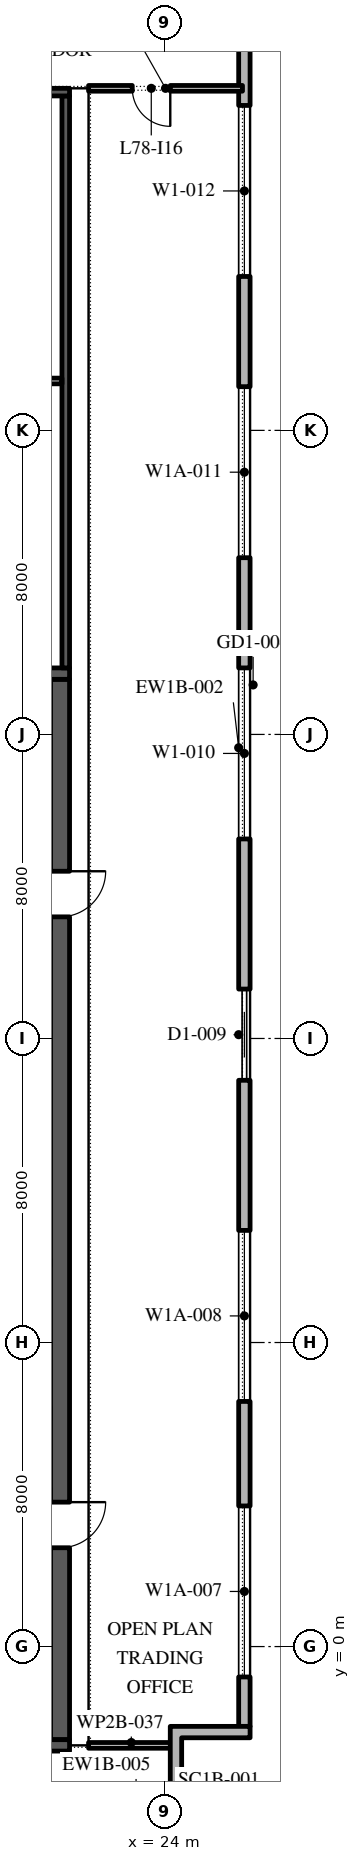
"""IFC4 building model, lengths in metres.
Left out: names, types, materials, properties, quantities, classifications, styles, units other than length and angle.
Written with IfcOpenShell. Run it as: python <this file> out.ifc"""

import sys

from ifc_helpers import new_model, si_unit, direction, frame, frame_2d, origin, place, context, subcontext, project, spatial, polyline, rectangle, outline, extrude, element, fill, save


model = new_model("IFC4")
c1 = context("Model", 3, precision=1e-05, world=origin(), true_north=direction((0.0, 1.0)))
c2 = subcontext(c1, "Body", "Model", "MODEL_VIEW")
j1 = project(units=[si_unit("LENGTHUNIT", "METRE"), si_unit("PLANEANGLEUNIT", "RADIAN")], contexts=[c1])
p1 = place(None, origin())
s1 = spatial("IfcSite", under=j1, at=p1, CompositionType="ELEMENT")
p2 = place(p1, origin())
s2 = spatial("IfcBuilding", under=s1, at=p2, CompositionType="ELEMENT")
p3 = place(p2, frame((0.0, 0.0, 355.2)))
s3 = spatial("IfcBuildingStorey", under=s2, at=p3, CompositionType="ELEMENT", Elevation=355.2)
p4 = place(p3, frame((26.1, -2.1, 0.0), z_axis=(0.0, 0.0, 1.0), x_axis=(0.0, 1.0, 0.0)))
e1 = element("IfcWall", 1, at=p4, inside=s3, PredefinedType="STANDARD", context=c2, shape_type="SweptSolid", body=[
    extrude(rectangle(XDim=51.5, YDim=0.3, at=frame_2d((25.75, 0.0))), origin(), (0.0, 0.0, 1.0), 3.95),
])
p5 = place(p4, frame((1.3, 0.0, 0.45)))
e2 = element("IfcOpeningElement", 2, at=p5, cuts=e1, PredefinedType="OPENING", context=c2, shape_type="SweptSolid", body=[
    extrude(rectangle(XDim=4.5, YDim=3.0, at=frame_2d((2.25, 1.5))), frame((0.0, 0.16, 0.0), z_axis=(0.0, -1.0, 0.0), x_axis=(1.0, 0.0, 0.0)), (0.0, 0.0, 1.0), 0.32),
])
p6 = place(p4, frame((8.55, 0.0, 0.45)))
e3 = element("IfcOpeningElement", 3, at=p6, cuts=e1, PredefinedType="OPENING", context=c2, shape_type="SweptSolid", body=[
    extrude(rectangle(XDim=4.5, YDim=3.0, at=frame_2d((2.25, 1.5))), frame((0.0, 0.16, 0.0), z_axis=(0.0, -1.0, 0.0), x_axis=(1.0, 0.0, 0.0)), (0.0, 0.0, 1.0), 0.32),
])
p7 = place(p4, frame((17.0, 0.0, 0.0)))
e4 = element("IfcOpeningElement", 4, at=p7, cuts=e1, PredefinedType="OPENING", context=c2, shape_type="SweptSolid", body=[
    extrude(rectangle(XDim=2.4, YDim=3.5, at=frame_2d((1.2, 1.75))), frame((0.0, 0.16, 0.0), z_axis=(0.0, -1.0, 0.0), x_axis=(1.0, 0.0, 0.0)), (0.0, 0.0, 1.0), 0.32),
])
p8 = place(p4, frame((23.35, 0.0, 0.45)))
e5 = element("IfcOpeningElement", 5, at=p8, cuts=e1, PredefinedType="OPENING", context=c2, shape_type="SweptSolid", body=[
    extrude(rectangle(XDim=4.5, YDim=3.05, at=frame_2d((2.25, 1.525))), frame((0.0, 0.16, 0.0), z_axis=(0.0, -1.0, 0.0), x_axis=(1.0, 0.0, 0.0)), (0.0, 0.0, 1.0), 0.32),
])
p9 = place(p4, frame((30.75, 0.0, 0.45)))
e6 = element("IfcOpeningElement", 6, at=p9, cuts=e1, PredefinedType="OPENING", context=c2, shape_type="SweptSolid", body=[
    extrude(rectangle(XDim=4.5, YDim=3.0, at=frame_2d((2.25, 1.5))), frame((0.0, 0.16, 0.0), z_axis=(0.0, -1.0, 0.0), x_axis=(1.0, 0.0, 0.0)), (0.0, 0.0, 1.0), 0.32),
])
p10 = place(p4, frame((38.15, 0.0, 0.45)))
e7 = element("IfcOpeningElement", 7, at=p10, cuts=e1, PredefinedType="OPENING", context=c2, shape_type="SweptSolid", body=[
    extrude(rectangle(XDim=4.5, YDim=3.05, at=frame_2d((2.25, 1.525))), frame((0.0, 0.16, 0.0), z_axis=(0.0, -1.0, 0.0), x_axis=(1.0, 0.0, 0.0)), (0.0, 0.0, 1.0), 0.32),
])
p11 = place(p4, frame((46.6, 0.0, 0.0)))
e8 = element("IfcOpeningElement", 8, at=p11, cuts=e1, PredefinedType="OPENING", context=c2, shape_type="SweptSolid", body=[
    extrude(rectangle(XDim=2.4, YDim=3.5, at=frame_2d((1.2, 1.75))), frame((0.0, 0.16, 0.0), z_axis=(0.0, -1.0, 0.0), x_axis=(1.0, 0.0, 0.0)), (0.0, 0.0, 1.0), 0.32),
])
p12 = place(p3, origin())
e9 = element("IfcWall", 9, at=p12, inside=s3, PredefinedType="STANDARD", context=c2, shape_type="SweptSolid", body=[
    extrude(outline(polyline([(24.15, -3.9), (24.15, -2.1), (26.25, -2.1), (26.25, -2.4), (24.45, -2.4), (24.45, -4.2), (22.65, -4.2), (22.65, -5.7), (22.35, -5.7), (22.35, -3.9), (24.15, -3.9)])), origin(), (0.0, 0.0, 1.0), 3.95),
])
p13 = place(p3, frame((21.25, -2.45, 0.0), z_axis=(0.0, 0.0, 1.0), x_axis=(0.0, 1.0, 0.0)))
e10 = element("IfcWall", 10, at=p13, inside=s3, PredefinedType="SHEAR", context=c2, shape_type="SweptSolid", body=[
    extrude(rectangle(XDim=27.9, YDim=0.5, at=frame_2d((13.95, 0.0))), origin(), (0.0, 0.0, 1.0), 3.95),
])
p14 = place(p13, frame((5.05, 0.0, 0.0)))
e11 = element("IfcOpeningElement", 11, at=p14, cuts=e10, PredefinedType="OPENING", context=c2, shape_type="SweptSolid", body=[
    extrude(rectangle(XDim=1.2, YDim=2.1, at=frame_2d((0.6, 1.05))), frame((0.0, 0.26, 0.0), z_axis=(0.0, -1.0, 0.0), x_axis=(1.0, 0.0, 0.0)), (0.0, 0.0, 1.0), 0.52),
])
p15 = place(p13, frame((21.65, 0.0, 0.0)))
e12 = element("IfcOpeningElement", 12, at=p15, cuts=e10, PredefinedType="OPENING", context=c2, shape_type="SweptSolid", body=[
    extrude(rectangle(XDim=1.2, YDim=2.1, at=frame_2d((0.6, 1.05))), frame((0.0, 0.26, 0.0), z_axis=(0.0, -1.0, 0.0), x_axis=(1.0, 0.0, 0.0)), (0.0, 0.0, 1.0), 0.52),
])
for number, where, z_axis, x_axis in (
    (13, (10.5, -2.6, 0.0), (0.0, 0.0, 1.0), (1.0, 0.0, 0.0)),
    (14, (10.5, 25.6, 0.0), (0.0, 0.0, 1.0), (1.0, 0.0, 0.0)),
):
    element("IfcWall", number, at=place(p3, frame(where, z_axis=z_axis, x_axis=x_axis)), inside=s3, PredefinedType="SHEAR", context=c2, shape_type="SweptSolid", body=[
        extrude(rectangle(XDim=11.0, YDim=0.3, at=frame_2d((5.5, 0.0))), origin(), (0.0, 0.0, 1.0), 3.95),
    ])
p16 = place(p3, frame((21.4, 25.75, 0.0), z_axis=(0.0, 0.0, 1.0), x_axis=(0.0, 1.0, 0.0)))
e15 = element("IfcWall", 15, at=p16, inside=s3, PredefinedType="SHEAR", context=c2, shape_type="SweptSolid", body=[
    extrude(rectangle(XDim=15.05, YDim=0.2, at=frame_2d((7.525, 0.0))), origin(), (0.0, 0.0, 1.0), 3.95),
])
p17 = place(p3, frame((10.5, 40.9, 0.0), z_axis=(0.0, 0.0, 1.0), x_axis=(1.0, 0.0, 0.0)))
e16 = element("IfcWall", 16, at=p17, inside=s3, PredefinedType="SHEAR", context=c2, shape_type="SweptSolid", body=[
    extrude(rectangle(XDim=11.0, YDim=0.2, at=frame_2d((5.5, 0.0))), origin(), (0.0, 0.0, 1.0), 3.95),
])
p18 = place(p3, frame((10.7, 33.3, 0.0), z_axis=(0.0, 0.0, 1.0), x_axis=(1.0, 0.0, 0.0)))
e17 = element("IfcWall", 17, at=p18, inside=s3, PredefinedType="PARTITIONING", context=c2, shape_type="SweptSolid", body=[
    extrude(rectangle(XDim=10.6, YDim=0.15, at=frame_2d((5.3, 0.0))), origin(), (0.0, 0.0, 1.0), 3.95),
])
p19 = place(p3, frame((22.0, -2.6, 0.0), z_axis=(0.0, 0.0, 1.0), x_axis=(1.0, 0.0, 0.0)))
e18 = element("IfcWall", 18, at=p19, inside=s3, PredefinedType="PARTITIONING", context=c2, shape_type="SweptSolid", body=[
    extrude(rectangle(XDim=2.25, YDim=0.15, at=frame_2d((1.125, 0.0))), origin(), (0.0, 0.0, 1.0), 3.95),
])
p20 = place(p3, frame((26.05, 41.0, 0.0), z_axis=(0.0, 0.0, 1.0), x_axis=(-1.0, 0.0, 0.0)))
e19 = element("IfcWall", 19, at=p20, inside=s3, PredefinedType="PARTITIONING", context=c2, shape_type="SweptSolid", body=[
    extrude(rectangle(XDim=4.05, YDim=0.15, at=frame_2d((2.025, 0.0))), origin(), (0.0, 0.0, 1.0), 3.95),
])
p21 = place(p20, frame((1.9, 0.0, 0.0)))
e20 = element("IfcOpeningElement", 20, at=p21, cuts=e19, PredefinedType="OPENING", context=c2, shape_type="SweptSolid", body=[
    extrude(rectangle(XDim=1.0, YDim=2.1, at=frame_2d((0.5, 1.05))), frame((0.0, 0.085, 0.0), z_axis=(0.0, -1.0, 0.0), x_axis=(1.0, 0.0, 0.0)), (0.0, 0.0, 1.0), 0.17),
])
p22 = place(p5, origin())
e21 = element("IfcWindow", 21, at=p22, inside=s3, PartitioningType="DOUBLE_PANEL_VERTICAL", PredefinedType="WINDOW", context=c2, shape_type="SweptSolid", body=[
    extrude(rectangle(XDim=4.5, YDim=3.0, at=frame_2d((2.25, 1.5))), frame((0.0, 0.03, 0.0), z_axis=(0.0, -1.0, 0.0), x_axis=(1.0, 0.0, 0.0)), (0.0, 0.0, 1.0), 0.06),
])
fill(e2, e21)
p23 = place(p6, origin())
e22 = element("IfcWindow", 22, at=p23, inside=s3, PartitioningType="DOUBLE_PANEL_VERTICAL", PredefinedType="WINDOW", context=c2, shape_type="SweptSolid", body=[
    extrude(rectangle(XDim=4.5, YDim=3.0, at=frame_2d((2.25, 1.5))), frame((0.0, 0.03, 0.0), z_axis=(0.0, -1.0, 0.0), x_axis=(1.0, 0.0, 0.0)), (0.0, 0.0, 1.0), 0.06),
])
fill(e3, e22)
p24 = place(p7, origin())
e23 = element("IfcDoor", 23, at=p24, inside=s3, OperationType="DOUBLE_DOOR_SLIDING", PredefinedType="DOOR", context=c2, shape_type="SweptSolid", body=[
    extrude(rectangle(XDim=2.4, YDim=3.5, at=frame_2d((1.2, 1.75))), frame((0.0, 0.025, 0.0), z_axis=(0.0, -1.0, 0.0), x_axis=(1.0, 0.0, 0.0)), (0.0, 0.0, 1.0), 0.05),
])
fill(e4, e23)
p25 = place(p8, origin())
e24 = element("IfcWindow", 24, at=p25, inside=s3, PartitioningType="DOUBLE_PANEL_VERTICAL", PredefinedType="WINDOW", context=c2, shape_type="SweptSolid", body=[
    extrude(rectangle(XDim=4.5, YDim=3.05, at=frame_2d((2.25, 1.525))), frame((0.0, 0.03, 0.0), z_axis=(0.0, -1.0, 0.0), x_axis=(1.0, 0.0, 0.0)), (0.0, 0.0, 1.0), 0.06),
])
fill(e5, e24)
p26 = place(p9, origin())
e25 = element("IfcWindow", 25, at=p26, inside=s3, PartitioningType="DOUBLE_PANEL_VERTICAL", PredefinedType="WINDOW", context=c2, shape_type="SweptSolid", body=[
    extrude(rectangle(XDim=4.5, YDim=3.0, at=frame_2d((2.25, 1.5))), frame((0.0, 0.03, 0.0), z_axis=(0.0, -1.0, 0.0), x_axis=(1.0, 0.0, 0.0)), (0.0, 0.0, 1.0), 0.06),
])
fill(e6, e25)
p27 = place(p10, origin())
e26 = element("IfcWindow", 26, at=p27, inside=s3, PartitioningType="DOUBLE_PANEL_VERTICAL", PredefinedType="WINDOW", context=c2, shape_type="SweptSolid", body=[
    extrude(rectangle(XDim=4.5, YDim=3.05, at=frame_2d((2.25, 1.525))), frame((0.0, 0.03, 0.0), z_axis=(0.0, -1.0, 0.0), x_axis=(1.0, 0.0, 0.0)), (0.0, 0.0, 1.0), 0.06),
])
fill(e7, e26)
p28 = place(p14, frame((1.2, 0.0, 0.0), z_axis=(0.0, 0.0, 1.0), x_axis=(-1.0, 0.0, 0.0)))
e27 = element("IfcDoor", 27, at=p28, inside=s3, OperationType="SINGLE_SWING_RIGHT", PredefinedType="DOOR", context=c2, shape_type="SweptSolid", body=[
    extrude(rectangle(XDim=1.2, YDim=2.1, at=frame_2d((0.6, 1.05))), frame((0.0, 0.025, 0.0), z_axis=(0.0, -1.0, 0.0), x_axis=(1.0, 0.0, 0.0)), (0.0, 0.0, 1.0), 0.05),
])
fill(e11, e27)
p29 = place(p15, frame((1.2, 0.0, 0.0), z_axis=(0.0, 0.0, 1.0), x_axis=(-1.0, 0.0, 0.0)))
e28 = element("IfcDoor", 28, at=p29, inside=s3, OperationType="SINGLE_SWING_RIGHT", PredefinedType="DOOR", context=c2, shape_type="SweptSolid", body=[
    extrude(rectangle(XDim=1.2, YDim=2.1, at=frame_2d((0.6, 1.05))), frame((0.0, 0.025, 0.0), z_axis=(0.0, -1.0, 0.0), x_axis=(1.0, 0.0, 0.0)), (0.0, 0.0, 1.0), 0.05),
])
fill(e12, e28)
p30 = place(p21, origin())
e29 = element("IfcDoor", 29, at=p30, inside=s3, OperationType="SINGLE_SWING_RIGHT", PredefinedType="DOOR", context=c2, shape_type="SweptSolid", body=[
    extrude(rectangle(XDim=1.0, YDim=2.1, at=frame_2d((0.5, 1.05))), frame((0.0, 0.025, 0.0), z_axis=(0.0, -1.0, 0.0), x_axis=(1.0, 0.0, 0.0)), (0.0, 0.0, 1.0), 0.05),
])
fill(e20, e29)
save(model, sys.argv[1])
